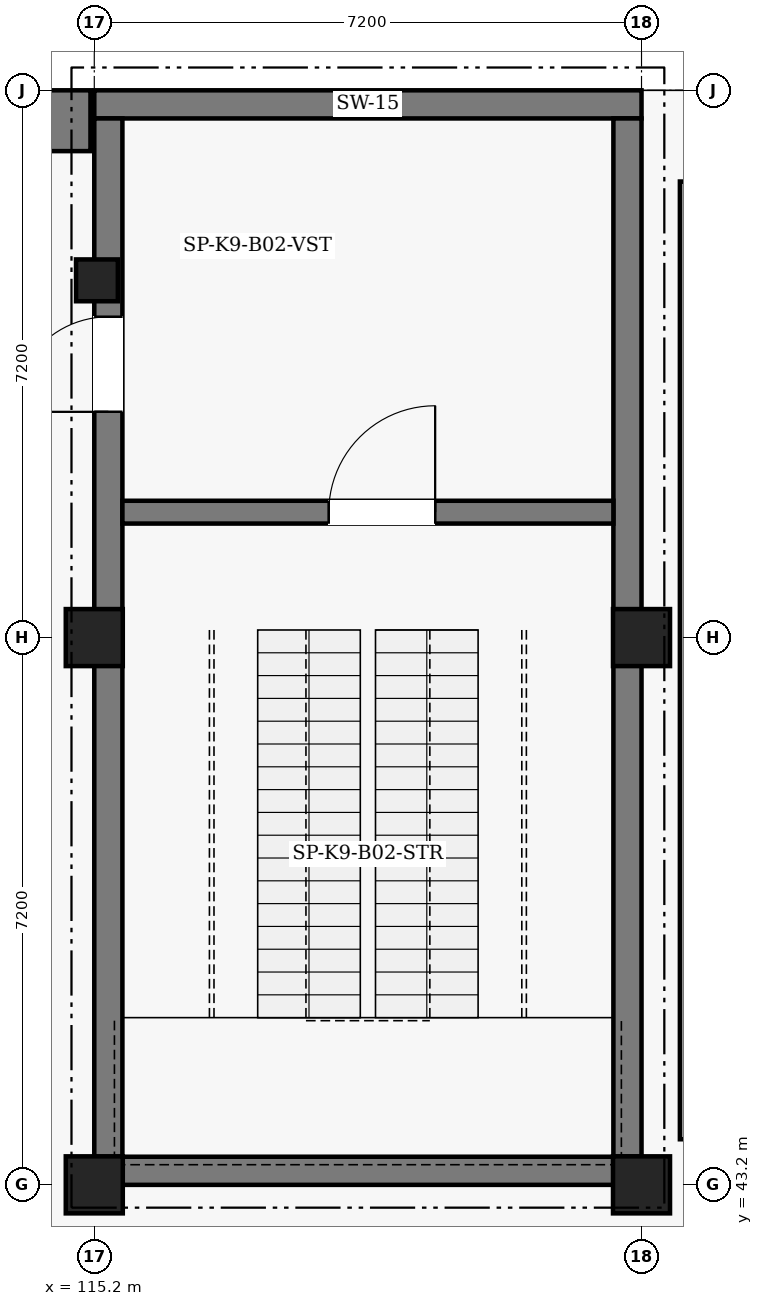
"""IFC4 building model, lengths in metres.
Left out: names, types, materials, properties, quantities, classifications, styles, units other than length and angle.
Written with IfcOpenShell. Run it as: python <this file> out.ifc"""

import sys

from ifc_helpers import new_model, si_unit, direction, frame, frame_2d, origin, origin_2d, place, context, subcontext, project, spatial, rectangle, extrude, element, fill, save


model = new_model("IFC4")
c1 = context("Model", 3, precision=1e-05, world=origin(), true_north=direction((0.0, 1.0)))
c2 = subcontext(c1, "Body", "Model", "MODEL_VIEW")
j1 = project(units=[si_unit("LENGTHUNIT", "METRE"), si_unit("PLANEANGLEUNIT", "RADIAN")], contexts=[c1])
p1 = place(None, origin())
s1 = spatial("IfcSite", under=j1, at=p1, CompositionType="ELEMENT")
p2 = place(p1, origin())
s2 = spatial("IfcBuilding", under=s1, at=p2, CompositionType="ELEMENT")
p3 = place(p2, frame((0.0, 0.0, -10.8)))
s3 = spatial("IfcBuildingStorey", under=s2, at=p3, CompositionType="ELEMENT", Elevation=-10.8)
p4 = place(p3, frame((109.8, 57.2, 0.0), z_axis=(0.0, 0.0, 1.0), x_axis=(1.0, 0.0, 0.0)))
e1 = element("IfcWall", 1, at=p4, inside=s3, PredefinedType="USERDEFINED", context=c2, shape_type="SweptSolid", body=[
    extrude(rectangle(XDim=5.35, YDim=0.8, at=frame_2d((2.675, 0.0))), origin(), (0.0, 0.0, 1.0), 5.0),
])
p5 = place(p3, frame((115.2, 57.415, 0.0), z_axis=(0.0, 0.0, 1.0), x_axis=(1.0, 0.0, 0.0)))
e2 = element("IfcWall", 2, at=p5, inside=s3, PredefinedType="SHEAR", context=c2, shape_type="SweptSolid", body=[
    extrude(rectangle(XDim=7.2, YDim=0.37, at=frame_2d((3.6, 0.0))), origin(), (0.0, 0.0, 1.0), 5.4),
])
p6 = place(p3, frame((122.215, 57.23, 0.0), z_axis=(0.0, 0.0, 1.0), x_axis=(0.0, -1.0, 0.0)))
e3 = element("IfcWall", 3, at=p6, inside=s3, PredefinedType="SHEAR", context=c2, shape_type="SweptSolid", body=[
    extrude(rectangle(XDim=13.66, YDim=0.37, at=frame_2d((6.83, 0.0))), origin(), (0.0, 0.0, 1.0), 5.4),
])
p7 = place(p3, frame((122.4, 43.385, 0.0), z_axis=(0.0, 0.0, 1.0), x_axis=(-1.0, 0.0, 0.0)))
e4 = element("IfcWall", 4, at=p7, inside=s3, PredefinedType="SHEAR", context=c2, shape_type="SweptSolid", body=[
    extrude(rectangle(XDim=7.2, YDim=0.37, at=frame_2d((3.6, 0.0))), origin(), (0.0, 0.0, 1.0), 5.4),
])
p8 = place(p3, frame((115.385, 43.57, 0.0), z_axis=(0.0, 0.0, 1.0), x_axis=(0.0, 1.0, 0.0)))
e5 = element("IfcWall", 5, at=p8, inside=s3, PredefinedType="SHEAR", context=c2, shape_type="SweptSolid", body=[
    extrude(rectangle(XDim=13.66, YDim=0.37, at=frame_2d((6.83, 0.0))), origin(), (0.0, 0.0, 1.0), 5.4),
])
p9 = place(p8, frame((9.8, 0.0, 0.0)))
e6 = element("IfcOpeningElement", 6, at=p9, cuts=e5, PredefinedType="OPENING", context=c2, shape_type="SweptSolid", body=[
    extrude(rectangle(XDim=1.25, YDim=2.2, at=frame_2d((0.625, 1.1))), frame((0.0, 0.195, 0.0), z_axis=(0.0, -1.0, 0.0), x_axis=(1.0, 0.0, 0.0)), (0.0, 0.0, 1.0), 0.39),
])
p10 = place(p3, frame((115.57, 52.05, 0.0), z_axis=(0.0, 0.0, 1.0), x_axis=(1.0, 0.0, 0.0)))
e7 = element("IfcWall", 7, at=p10, inside=s3, PredefinedType="SHEAR", context=c2, shape_type="SweptSolid", body=[
    extrude(rectangle(XDim=6.46, YDim=0.3, at=frame_2d((3.23, 0.0))), origin(), (0.0, 0.0, 1.0), 5.4),
])
p11 = place(p10, frame((2.715, 0.0, 0.0)))
e8 = element("IfcOpeningElement", 8, at=p11, cuts=e7, PredefinedType="OPENING", context=c2, shape_type="SweptSolid", body=[
    extrude(rectangle(XDim=1.4, YDim=2.2, at=frame_2d((0.7, 1.1))), frame((0.0, 0.16, 0.0), z_axis=(0.0, -1.0, 0.0), x_axis=(1.0, 0.0, 0.0)), (0.0, 0.0, 1.0), 0.32),
])
for number, where, z_axis, x_axis in (
    (9, (115.2, 43.2, 0.0), (0.0, 0.0, 1.0), (1.0, 0.0, 0.0)),
    (10, (115.2, 50.4, 0.0), (0.0, 0.0, 1.0), (1.0, 0.0, 0.0)),
    (11, (122.4, 43.2, 0.0), (0.0, 0.0, 1.0), (1.0, 0.0, 0.0)),
    (12, (122.4, 50.4, 0.0), (0.0, 0.0, 1.0), (1.0, 0.0, 0.0)),
):
    element("IfcColumn", number, at=place(p3, frame(where, z_axis=z_axis, x_axis=x_axis)), inside=s3, PredefinedType="COLUMN", context=c2, shape_type="SweptSolid", body=[
        extrude(rectangle(XDim=0.75, YDim=0.75, at=origin_2d()), origin(), (0.0, 0.0, 1.0), 5.0),
    ])
p12 = place(p3, frame((115.235, 55.1, 0.0), z_axis=(0.0, 0.0, 1.0), x_axis=(1.0, 0.0, 0.0)))
e13 = element("IfcColumn", 13, at=p12, inside=s3, PredefinedType="COLUMN", context=c2, shape_type="SweptSolid", body=[
    extrude(rectangle(XDim=0.55, YDim=0.55, at=origin_2d()), origin(), (0.0, 0.0, 1.0), 5.0),
])
p13 = place(p3, frame((123.0, 43.8, 0.0), z_axis=(0.0, 0.0, 1.0), x_axis=(0.0, 1.0, 0.0)))
e14 = element("IfcWall", 14, at=p13, inside=s3, PredefinedType="PARTITIONING", context=c2, shape_type="SweptSolid", body=[
    extrude(rectangle(XDim=12.6, YDim=0.19, at=frame_2d((6.3, 0.0))), origin(), (0.0, 0.0, 1.0), 4.1),
])
p14 = place(p11, origin())
e15 = element("IfcDoor", 15, at=p14, inside=s3, OperationType="SINGLE_SWING_RIGHT", PredefinedType="DOOR", context=c2, shape_type="SweptSolid", body=[
    extrude(rectangle(XDim=1.4, YDim=2.2, at=frame_2d((0.7, 1.1))), frame((0.0, 0.025, 0.0), z_axis=(0.0, -1.0, 0.0), x_axis=(1.0, 0.0, 0.0)), (0.0, 0.0, 1.0), 0.05),
])
fill(e8, e15)
p15 = place(p9, origin())
e16 = element("IfcDoor", 16, at=p15, inside=s3, OperationType="SINGLE_SWING_LEFT", PredefinedType="DOOR", context=c2, shape_type="SweptSolid", body=[
    extrude(rectangle(XDim=1.25, YDim=2.2, at=frame_2d((0.625, 1.1))), frame((0.0, 0.025, 0.0), z_axis=(0.0, -1.0, 0.0), x_axis=(1.0, 0.0, 0.0)), (0.0, 0.0, 1.0), 0.05),
])
fill(e6, e16)
save(model, sys.argv[1])
